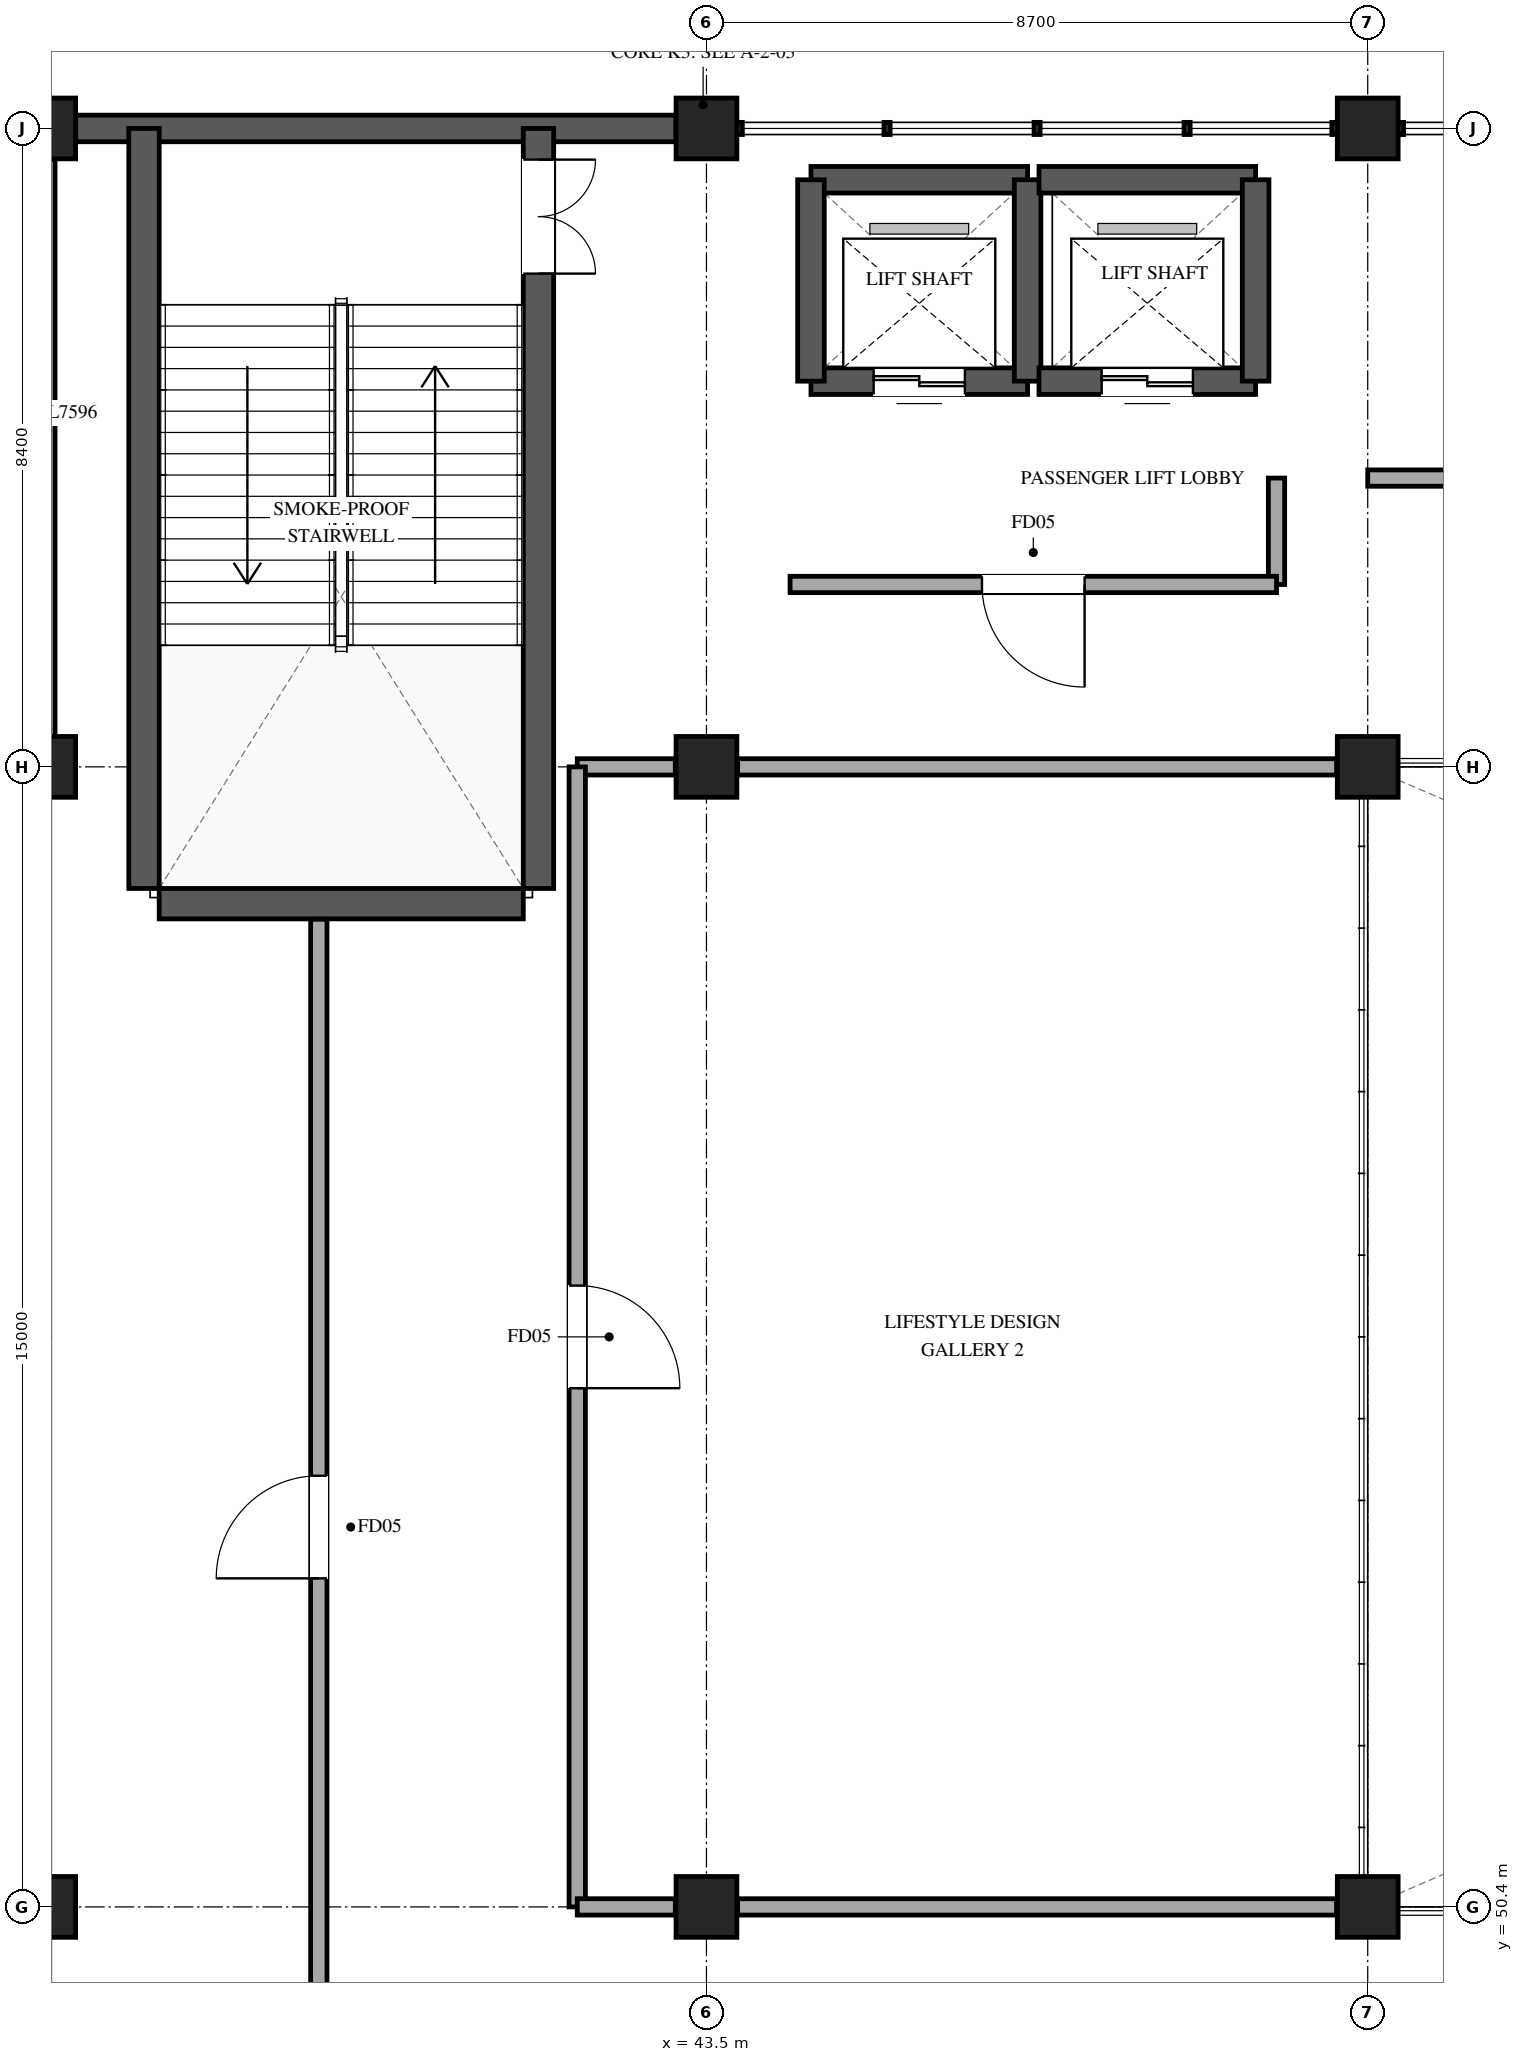
"""IFC4 building model, lengths in metres.
Left out: names, types, materials, properties, quantities, classifications, styles, units other than length and angle.
Written with IfcOpenShell. Run it as: python <this file> out.ifc"""

import sys

from ifc_helpers import new_model, si_unit, direction, frame, frame_2d, origin, origin_2d, place, context, subcontext, project, spatial, rectangle, extrude, element, fill, save


model = new_model("IFC4")
c1 = context("Model", 3, precision=1e-05, world=origin(), true_north=direction((0.0, 1.0)))
c2 = subcontext(c1, "Body", "Model", "MODEL_VIEW")
j1 = project(units=[si_unit("LENGTHUNIT", "METRE"), si_unit("PLANEANGLEUNIT", "RADIAN")], contexts=[c1])
p1 = place(None, origin())
s1 = spatial("IfcSite", under=j1, at=p1, CompositionType="ELEMENT")
p2 = place(p1, origin())
s2 = spatial("IfcBuilding", under=s1, at=p2, CompositionType="ELEMENT")
p3 = place(p2, frame((0.0, 0.0, 21.6)))
s3 = spatial("IfcBuildingStorey", under=s2, at=p3, CompositionType="ELEMENT", Elevation=21.6)
for number, where, z_axis, x_axis in (
    (1, (34.8, 50.4, 0.0), (0.0, 0.0, 1.0), (1.0, 0.0, 0.0)),
    (2, (34.8, 65.4, 0.0), (0.0, 0.0, 1.0), (1.0, 0.0, 0.0)),
    (3, (34.8, 73.8, 0.0), (0.0, 0.0, 1.0), (1.0, 0.0, 0.0)),
    (4, (43.5, 50.4, 0.0), (0.0, 0.0, 1.0), (1.0, 0.0, 0.0)),
    (5, (43.5, 65.4, 0.0), (0.0, 0.0, 1.0), (1.0, 0.0, 0.0)),
    (6, (43.5, 73.8, 0.0), (0.0, 0.0, 1.0), (1.0, 0.0, 0.0)),
    (7, (52.2, 50.4, 0.0), (0.0, 0.0, 1.0), (1.0, 0.0, 0.0)),
    (8, (52.2, 65.4, 0.0), (0.0, 0.0, 1.0), (1.0, 0.0, 0.0)),
    (9, (52.2, 73.8, 0.0), (0.0, 0.0, 1.0), (1.0, 0.0, 0.0)),
):
    element("IfcColumn", number, at=place(p3, frame(where, z_axis=z_axis, x_axis=x_axis)), inside=s3, PredefinedType="COLUMN", context=c2, shape_type="SweptSolid", body=[
        extrude(rectangle(XDim=0.8, YDim=0.8, at=origin_2d()), origin(), (0.0, 0.0, 1.0), 5.1),
    ])
p4 = place(p3, frame((34.8, 65.802, 0.0), z_axis=(0.0, 0.0, 1.0), x_axis=(0.0, 1.0, 0.0)))
e10 = element("IfcWall", 10, at=p4, inside=s3, PredefinedType="STANDARD", context=c2, shape_type="SweptSolid", body=[
    extrude(rectangle(XDim=7.596, YDim=0.26, at=frame_2d((3.798, 0.0))), origin(), (0.0, 0.0, 1.0), 4.255),
])
p5 = place(p3, frame((35.202, 73.8, 0.0), z_axis=(0.0, 0.0, 1.0), x_axis=(1.0, 0.0, 0.0)))
e11 = element("IfcWall", 11, at=p5, inside=s3, PredefinedType="STANDARD", context=c2, shape_type="SweptSolid", body=[
    extrude(rectangle(XDim=7.896, YDim=0.35, at=frame_2d((3.948, 0.0))), origin(), (0.0, 0.0, 1.0), 4.79),
])
p6 = place(p3, frame((36.1, 63.8, 0.0), z_axis=(0.0, 0.0, 1.0), x_axis=(0.0, 1.0, 0.0)))
e12 = element("IfcWall", 12, at=p6, inside=s3, PredefinedType="SHEAR", context=c2, shape_type="SweptSolid", body=[
    extrude(rectangle(XDim=10.0, YDim=0.4, at=frame_2d((5.0, 0.0))), origin(), (0.0, 0.0, 1.0), 5.1),
])
p7 = place(p3, frame((41.29, 73.8, 0.0), z_axis=(0.0, 0.0, 1.0), x_axis=(0.0, -1.0, 0.0)))
e13 = element("IfcWall", 13, at=p7, inside=s3, PredefinedType="SHEAR", context=c2, shape_type="SweptSolid", body=[
    extrude(rectangle(XDim=10.0, YDim=0.4, at=frame_2d((5.0, 0.0))), origin(), (0.0, 0.0, 1.0), 5.1),
])
p8 = place(p7, frame((0.41, 0.0, 0.0)))
e14 = element("IfcOpeningElement", 14, at=p8, cuts=e13, PredefinedType="OPENING", context=c2, shape_type="SweptSolid", body=[
    extrude(rectangle(XDim=1.5, YDim=2.2, at=frame_2d((0.75, 1.1))), frame((0.0, 0.21, 0.0), z_axis=(0.0, -1.0, 0.0), x_axis=(1.0, 0.0, 0.0)), (0.0, 0.0, 1.0), 0.42),
])
p9 = place(p3, frame((41.09, 63.6, 0.0), z_axis=(0.0, 0.0, 1.0), x_axis=(-1.0, 0.0, 0.0)))
e15 = element("IfcWall", 15, at=p9, inside=s3, PredefinedType="SHEAR", context=c2, shape_type="SweptSolid", body=[
    extrude(rectangle(XDim=4.79, YDim=0.4, at=frame_2d((2.395, 0.0))), origin(), (0.0, 0.0, 1.0), 5.1),
])
p10 = place(p3, frame((44.875, 73.125, 0.0), z_axis=(0.0, 0.0, 1.0), x_axis=(1.0, 0.0, 0.0)))
e16 = element("IfcWall", 16, at=p10, inside=s3, PredefinedType="SHEAR", context=c2, shape_type="SweptSolid", body=[
    extrude(rectangle(XDim=2.85, YDim=0.35, at=frame_2d((1.425, 0.0))), origin(), (0.0, 0.0, 1.0), 5.1),
])
p11 = place(p3, frame((47.725, 70.475, 0.0), z_axis=(0.0, 0.0, 1.0), x_axis=(-1.0, 0.0, 0.0)))
e17 = element("IfcWall", 17, at=p11, inside=s3, PredefinedType="SHEAR", context=c2, shape_type="SweptSolid", body=[
    extrude(rectangle(XDim=2.85, YDim=0.35, at=frame_2d((1.425, 0.0))), origin(), (0.0, 0.0, 1.0), 5.1),
])
p12 = place(p11, frame((0.825, 0.0, 0.0)))
e18 = element("IfcOpeningElement", 18, at=p12, cuts=e17, PredefinedType="OPENING", context=c2, shape_type="SweptSolid", body=[
    extrude(rectangle(XDim=1.2, YDim=2.2, at=frame_2d((0.6, 1.1))), frame((0.0, 0.185, 0.0), z_axis=(0.0, -1.0, 0.0), x_axis=(1.0, 0.0, 0.0)), (0.0, 0.0, 1.0), 0.37),
])
for number, where, z_axis, x_axis in (
    (19, (44.875, 70.475, 0.0), (0.0, 0.0, 1.0), (0.0, 1.0, 0.0)),
    (20, (47.725, 73.125, 0.0), (0.0, 0.0, 1.0), (0.0, -1.0, 0.0)),
):
    element("IfcWall", number, at=place(p3, frame(where, z_axis=z_axis, x_axis=x_axis)), inside=s3, PredefinedType="SHEAR", context=c2, shape_type="SweptSolid", body=[
        extrude(rectangle(XDim=2.65, YDim=0.35, at=frame_2d((1.325, 0.0))), origin(), (0.0, 0.0, 1.0), 5.1),
    ])
p13 = place(p3, frame((47.875, 73.125, 0.0), z_axis=(0.0, 0.0, 1.0), x_axis=(1.0, 0.0, 0.0)))
e21 = element("IfcWall", 21, at=p13, inside=s3, PredefinedType="SHEAR", context=c2, shape_type="SweptSolid", body=[
    extrude(rectangle(XDim=2.85, YDim=0.35, at=frame_2d((1.425, 0.0))), origin(), (0.0, 0.0, 1.0), 5.1),
])
p14 = place(p3, frame((50.725, 70.475, 0.0), z_axis=(0.0, 0.0, 1.0), x_axis=(-1.0, 0.0, 0.0)))
e22 = element("IfcWall", 22, at=p14, inside=s3, PredefinedType="SHEAR", context=c2, shape_type="SweptSolid", body=[
    extrude(rectangle(XDim=2.85, YDim=0.35, at=frame_2d((1.425, 0.0))), origin(), (0.0, 0.0, 1.0), 5.1),
])
p15 = place(p14, frame((0.825, 0.0, 0.0)))
e23 = element("IfcOpeningElement", 23, at=p15, cuts=e22, PredefinedType="OPENING", context=c2, shape_type="SweptSolid", body=[
    extrude(rectangle(XDim=1.2, YDim=2.2, at=frame_2d((0.6, 1.1))), frame((0.0, 0.185, 0.0), z_axis=(0.0, -1.0, 0.0), x_axis=(1.0, 0.0, 0.0)), (0.0, 0.0, 1.0), 0.37),
])
p16 = place(p3, frame((50.725, 73.125, 0.0), z_axis=(0.0, 0.0, 1.0), x_axis=(0.0, -1.0, 0.0)))
e24 = element("IfcWall", 24, at=p16, inside=s3, PredefinedType="SHEAR", context=c2, shape_type="SweptSolid", body=[
    extrude(rectangle(XDim=2.65, YDim=0.35, at=frame_2d((1.325, 0.0))), origin(), (0.0, 0.0, 1.0), 5.1),
])
p17 = place(p3, frame((51.0, 69.2, 0.0), z_axis=(0.0, 0.0, 1.0), x_axis=(0.0, -1.0, 0.0)))
e25 = element("IfcWall", 25, at=p17, inside=s3, PredefinedType="PARTITIONING", context=c2, shape_type="SweptSolid", body=[
    extrude(rectangle(XDim=1.4, YDim=0.215, at=frame_2d((0.7, 0.0))), origin(), (0.0, 0.0, 1.0), 4.76),
])
p18 = place(p3, frame((51.0, 67.8, 0.0), z_axis=(0.0, 0.0, 1.0), x_axis=(-1.0, 0.0, 0.0)))
e26 = element("IfcWall", 26, at=p18, inside=s3, PredefinedType="PARTITIONING", context=c2, shape_type="SweptSolid", body=[
    extrude(rectangle(XDim=6.4, YDim=0.215, at=frame_2d((3.2, 0.0))), origin(), (0.0, 0.0, 1.0), 4.76),
])
p19 = place(p18, frame((2.525, 0.0, 0.0)))
e27 = element("IfcOpeningElement", 27, at=p19, cuts=e26, PredefinedType="OPENING", context=c2, shape_type="SweptSolid", body=[
    extrude(rectangle(XDim=1.35, YDim=2.2, at=frame_2d((0.675, 1.1))), frame((0.0, 0.118, 0.0), z_axis=(0.0, -1.0, 0.0), x_axis=(1.0, 0.0, 0.0)), (0.0, 0.0, 1.0), 0.235),
])
p20 = place(p3, frame((38.4, 47.4, 0.0), z_axis=(0.0, 0.0, 1.0), x_axis=(0.0, 1.0, 0.0)))
e28 = element("IfcWall", 28, at=p20, inside=s3, PredefinedType="PARTITIONING", context=c2, shape_type="SweptSolid", body=[
    extrude(rectangle(XDim=15.995, YDim=0.215, at=frame_2d((7.998, 0.0))), origin(), (0.0, 0.0, 1.0), 4.06),
])
p21 = place(p20, frame((7.323, 0.0, 0.0)))
e29 = element("IfcOpeningElement", 29, at=p21, cuts=e28, PredefinedType="OPENING", context=c2, shape_type="SweptSolid", body=[
    extrude(rectangle(XDim=1.35, YDim=2.2, at=frame_2d((0.675, 1.1))), frame((0.0, 0.118, 0.0), z_axis=(0.0, -1.0, 0.0), x_axis=(1.0, 0.0, 0.0)), (0.0, 0.0, 1.0), 0.235),
])
p22 = place(p3, frame((51.79, 65.4, 0.0), z_axis=(0.0, 0.0, 1.0), x_axis=(-1.0, 0.0, 0.0)))
e30 = element("IfcWall", 30, at=p22, inside=s3, PredefinedType="PARTITIONING", context=c2, shape_type="SweptSolid", body=[
    extrude(rectangle(XDim=7.88, YDim=0.215, at=frame_2d((3.94, 0.0))), origin(), (0.0, 0.0, 1.0), 4.06),
])
p23 = place(p3, frame((43.09, 65.4, 0.0), z_axis=(0.0, 0.0, 1.0), x_axis=(-1.0, 0.0, 0.0)))
e31 = element("IfcWall", 31, at=p23, inside=s3, PredefinedType="PARTITIONING", context=c2, shape_type="SweptSolid", body=[
    extrude(rectangle(XDim=1.29, YDim=0.215, at=frame_2d((0.645, 0.0))), origin(), (0.0, 0.0, 1.0), 4.76),
])
p24 = place(p3, frame((41.8, 65.4, 0.0), z_axis=(0.0, 0.0, 1.0), x_axis=(0.0, -1.0, 0.0)))
e32 = element("IfcWall", 32, at=p24, inside=s3, PredefinedType="PARTITIONING", context=c2, shape_type="SweptSolid", body=[
    extrude(rectangle(XDim=15.0, YDim=0.215, at=frame_2d((7.5, 0.0))), origin(), (0.0, 0.0, 1.0), 4.06),
])
p25 = place(p24, frame((6.825, 0.0, 0.0)))
e33 = element("IfcOpeningElement", 33, at=p25, cuts=e32, PredefinedType="OPENING", context=c2, shape_type="SweptSolid", body=[
    extrude(rectangle(XDim=1.35, YDim=2.2, at=frame_2d((0.675, 1.1))), frame((0.0, 0.118, 0.0), z_axis=(0.0, -1.0, 0.0), x_axis=(1.0, 0.0, 0.0)), (0.0, 0.0, 1.0), 0.235),
])
p26 = place(p3, frame((41.8, 50.4, 0.0), z_axis=(0.0, 0.0, 1.0), x_axis=(1.0, 0.0, 0.0)))
e34 = element("IfcWall", 34, at=p26, inside=s3, PredefinedType="PARTITIONING", context=c2, shape_type="SweptSolid", body=[
    extrude(rectangle(XDim=1.29, YDim=0.215, at=frame_2d((0.645, 0.0))), origin(), (0.0, 0.0, 1.0), 4.06),
])
p27 = place(p3, frame((43.91, 50.4, 0.0), z_axis=(0.0, 0.0, 1.0), x_axis=(1.0, 0.0, 0.0)))
e35 = element("IfcWall", 35, at=p27, inside=s3, PredefinedType="PARTITIONING", context=c2, shape_type="SweptSolid", body=[
    extrude(rectangle(XDim=7.88, YDim=0.215, at=frame_2d((3.94, 0.0))), origin(), (0.0, 0.0, 1.0), 4.06),
])
p28 = place(p3, frame((52.2, 69.2, 0.0), z_axis=(0.0, 0.0, 1.0), x_axis=(1.0, 0.0, 0.0)))
e36 = element("IfcWall", 36, at=p28, inside=s3, PredefinedType="PARTITIONING", context=c2, shape_type="SweptSolid", body=[
    extrude(rectangle(XDim=36.0, YDim=0.215, at=frame_2d((18.0, 0.0))), origin(), (0.0, 0.0, 1.0), 4.06),
])
p29 = place(p28, frame((17.325, 0.0, 0.0)))
e37 = element("IfcOpeningElement", 37, at=p29, cuts=e36, PredefinedType="OPENING", context=c2, shape_type="SweptSolid", body=[
    extrude(rectangle(XDim=1.35, YDim=2.2, at=frame_2d((0.675, 1.1))), frame((0.0, 0.118, 0.0), z_axis=(0.0, -1.0, 0.0), x_axis=(1.0, 0.0, 0.0)), (0.0, 0.0, 1.0), 0.235),
])
p30 = place(p8, origin())
e38 = element("IfcDoor", 38, at=p30, inside=s3, OperationType="DOUBLE_DOOR_SINGLE_SWING", PredefinedType="DOOR", context=c2, shape_type="SweptSolid", body=[
    extrude(rectangle(XDim=1.5, YDim=2.2, at=frame_2d((0.75, 1.1))), frame((0.0, 0.025, 0.0), z_axis=(0.0, -1.0, 0.0), x_axis=(1.0, 0.0, 0.0)), (0.0, 0.0, 1.0), 0.05),
])
fill(e14, e38)
p31 = place(p12, origin())
e39 = element("IfcDoor", 39, at=p31, inside=s3, OperationType="DOUBLE_DOOR_SLIDING", PredefinedType="DOOR", context=c2, shape_type="SweptSolid", body=[
    extrude(rectangle(XDim=1.2, YDim=2.2, at=frame_2d((0.6, 1.1))), frame((0.0, 0.025, 0.0), z_axis=(0.0, -1.0, 0.0), x_axis=(1.0, 0.0, 0.0)), (0.0, 0.0, 1.0), 0.05),
])
fill(e18, e39)
p32 = place(p15, origin())
e40 = element("IfcDoor", 40, at=p32, inside=s3, OperationType="DOUBLE_DOOR_SLIDING", PredefinedType="DOOR", context=c2, shape_type="SweptSolid", body=[
    extrude(rectangle(XDim=1.2, YDim=2.2, at=frame_2d((0.6, 1.1))), frame((0.0, 0.025, 0.0), z_axis=(0.0, -1.0, 0.0), x_axis=(1.0, 0.0, 0.0)), (0.0, 0.0, 1.0), 0.05),
])
fill(e23, e40)
p33 = place(p19, origin())
e41 = element("IfcDoor", 41, at=p33, inside=s3, OperationType="SINGLE_SWING_LEFT", PredefinedType="DOOR", context=c2, shape_type="SweptSolid", body=[
    extrude(rectangle(XDim=1.35, YDim=2.2, at=frame_2d((0.675, 1.1))), frame((0.0, 0.025, 0.0), z_axis=(0.0, -1.0, 0.0), x_axis=(1.0, 0.0, 0.0)), (0.0, 0.0, 1.0), 0.05),
])
fill(e27, e41)
p34 = place(p21, origin())
e42 = element("IfcDoor", 42, at=p34, inside=s3, OperationType="SINGLE_SWING_LEFT", PredefinedType="DOOR", context=c2, shape_type="SweptSolid", body=[
    extrude(rectangle(XDim=1.35, YDim=2.2, at=frame_2d((0.675, 1.1))), frame((0.0, 0.025, 0.0), z_axis=(0.0, -1.0, 0.0), x_axis=(1.0, 0.0, 0.0)), (0.0, 0.0, 1.0), 0.05),
])
fill(e29, e42)
p35 = place(p25, origin())
e43 = element("IfcDoor", 43, at=p35, inside=s3, OperationType="SINGLE_SWING_RIGHT", PredefinedType="DOOR", context=c2, shape_type="SweptSolid", body=[
    extrude(rectangle(XDim=1.35, YDim=2.2, at=frame_2d((0.675, 1.1))), frame((0.0, 0.025, 0.0), z_axis=(0.0, -1.0, 0.0), x_axis=(1.0, 0.0, 0.0)), (0.0, 0.0, 1.0), 0.05),
])
fill(e33, e43)
save(model, sys.argv[1])
